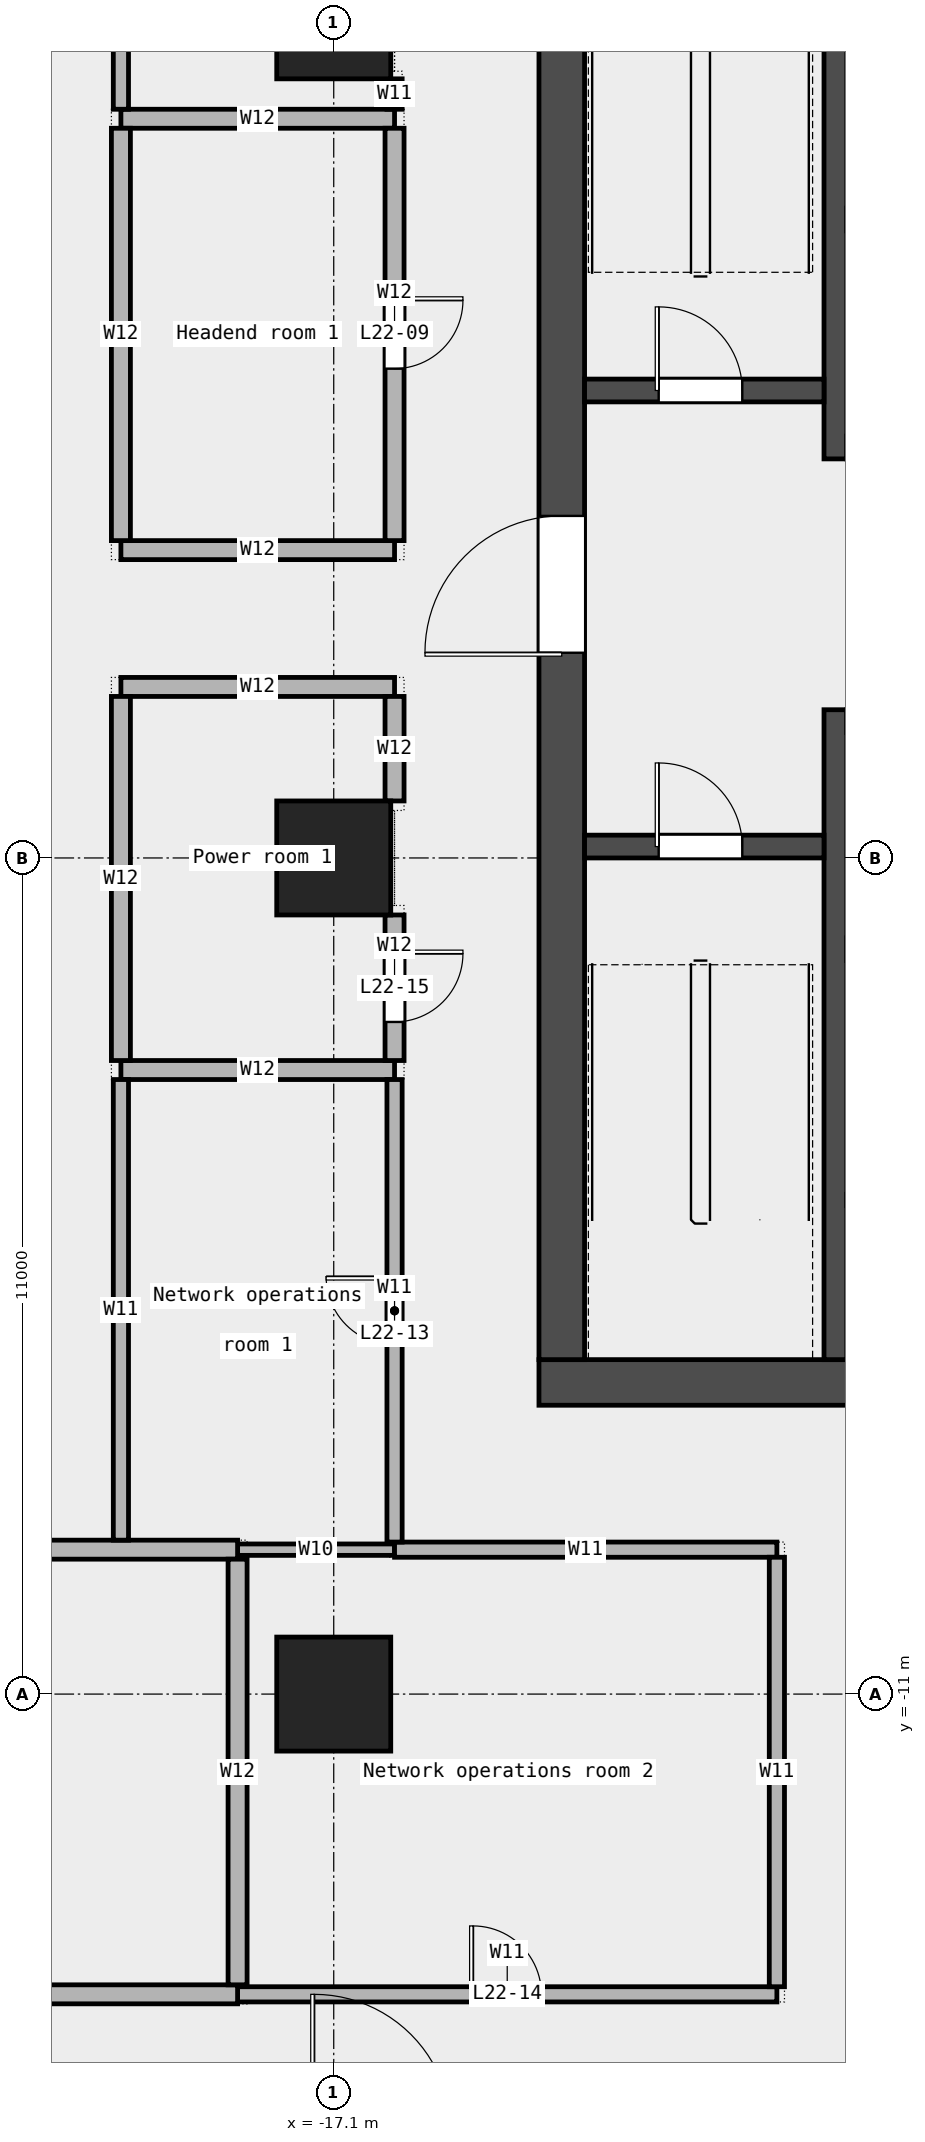
"""IFC4 building model, lengths in metres.
Left out: names, types, materials, properties, quantities, classifications, styles, units other than length and angle.
Written with IfcOpenShell. Run it as: python <this file> out.ifc"""

import sys

from ifc_helpers import new_model, si_unit, direction, frame, frame_2d, origin, origin_2d, place, context, subcontext, project, spatial, rectangle, extrude, element, fill, save


model = new_model("IFC4")
c1 = context("Model", 3, precision=1e-05, world=origin(), true_north=direction((0.0, 1.0)))
c2 = subcontext(c1, "Body", "Model", "MODEL_VIEW")
j1 = project(units=[si_unit("LENGTHUNIT", "METRE"), si_unit("PLANEANGLEUNIT", "RADIAN")], contexts=[c1])
p1 = place(None, origin())
s1 = spatial("IfcSite", under=j1, at=p1, CompositionType="ELEMENT")
p2 = place(p1, origin())
s2 = spatial("IfcBuilding", under=s1, at=p2, CompositionType="ELEMENT")
p3 = place(p2, frame((0.0, 0.0, 112.6)))
s3 = spatial("IfcBuildingStorey", under=s2, at=p3, CompositionType="ELEMENT", Elevation=112.6)
for number, where, z_axis, x_axis in (
    (1, (-17.1, -11.0, 0.0), (0.0, 0.0, 1.0), (1.0, 0.0, 0.0)),
    (2, (-17.1, 0.0, 0.0), (0.0, 0.0, 1.0), (1.0, 0.0, 0.0)),
    (3, (-17.1, 11.0, 0.0), (0.0, 0.0, 1.0), (1.0, 0.0, 0.0)),
):
    element("IfcColumn", number, at=place(p3, frame(where, z_axis=z_axis, x_axis=x_axis)), inside=s3, PredefinedType="COLUMN", context=c2, shape_type="SweptSolid", body=[
        extrude(rectangle(XDim=1.5, YDim=1.5, at=origin_2d()), origin(), (0.0, 0.0, 1.0), 4.05),
    ])
p4 = place(p3, frame((-18.365, -14.95, 0.0), z_axis=(0.0, 0.0, 1.0), x_axis=(1.0, 0.0, 0.0)))
e4 = element("IfcWall", 4, at=p4, inside=s3, PredefinedType="PARTITIONING", context=c2, shape_type="SweptSolid", body=[
    extrude(rectangle(XDim=7.095, YDim=0.2, at=frame_2d((3.547, 0.0))), origin(), (0.0, 0.0, 1.0), 4.05),
])
p5 = place(p4, frame((3.097, 0.0, 0.0)))
e5 = element("IfcOpeningElement", 5, at=p5, cuts=e4, PredefinedType="OPENING", context=c2, shape_type="SweptSolid", body=[
    extrude(rectangle(XDim=0.9, YDim=2.1, at=frame_2d((0.45, 1.05))), frame((0.0, 0.112, 0.0), z_axis=(0.0, -1.0, 0.0), x_axis=(1.0, 0.0, 0.0)), (0.0, 0.0, 1.0), 0.224),
])
p6 = place(p3, frame((-29.0, -14.95, 0.0), z_axis=(0.0, 0.0, 1.0), x_axis=(1.0, 0.0, 0.0)))
e6 = element("IfcWall", 6, at=p6, inside=s3, PredefinedType="PARTITIONING", context=c2, shape_type="SweptSolid", body=[
    extrude(rectangle(XDim=10.635, YDim=0.25, at=frame_2d((5.317, 0.0))), origin(), (0.0, 0.0, 1.0), 4.05),
])
p7 = place(p6, frame((4.817, 0.0, 0.0)))
e7 = element("IfcOpeningElement", 7, at=p7, cuts=e6, PredefinedType="OPENING", context=c2, shape_type="SweptSolid", body=[
    extrude(rectangle(XDim=1.2, YDim=2.1, at=frame_2d((0.6, 1.05))), frame((0.0, 0.137, 0.0), z_axis=(0.0, -1.0, 0.0), x_axis=(1.0, 0.0, 0.0)), (0.0, 0.0, 1.0), 0.274),
])
p8 = place(p3, frame((-18.365, -9.1, 0.0), z_axis=(0.0, 0.0, 1.0), x_axis=(1.0, 0.0, 0.0)))
e8 = element("IfcWall", 8, at=p8, inside=s3, PredefinedType="PARTITIONING", context=c2, shape_type="SweptSolid", body=[
    extrude(rectangle(XDim=2.065, YDim=0.15, at=frame_2d((1.032, 0.0))), origin(), (0.0, 0.0, 1.0), 4.05),
])
p9 = place(p3, frame((-16.3, -9.1, 0.0), z_axis=(0.0, 0.0, 1.0), x_axis=(1.0, 0.0, 0.0)))
e9 = element("IfcWall", 9, at=p9, inside=s3, PredefinedType="PARTITIONING", context=c2, shape_type="SweptSolid", body=[
    extrude(rectangle(XDim=5.03, YDim=0.2, at=frame_2d((2.515, 0.0))), origin(), (0.0, 0.0, 1.0), 4.05),
])
p10 = place(p3, frame((-29.0, -9.1, 0.0), z_axis=(0.0, 0.0, 1.0), x_axis=(1.0, 0.0, 0.0)))
e10 = element("IfcWall", 10, at=p10, inside=s3, PredefinedType="PARTITIONING", context=c2, shape_type="SweptSolid", body=[
    extrude(rectangle(XDim=10.635, YDim=0.25, at=frame_2d((5.317, 0.0))), origin(), (0.0, 0.0, 1.0), 4.05),
])
for number, where, z_axis, x_axis in (
    (11, (-19.9, -2.79, 0.0), (0.0, 0.0, 1.0), (1.0, 0.0, 0.0)),
    (12, (-19.9, 2.25, 0.0), (0.0, 0.0, 1.0), (1.0, 0.0, 0.0)),
    (13, (-19.9, 4.05, 0.0), (0.0, 0.0, 1.0), (1.0, 0.0, 0.0)),
    (14, (-19.9, 9.725, 0.0), (0.0, 0.0, 1.0), (1.0, 0.0, 0.0)),
):
    element("IfcWall", number, at=place(p3, frame(where, z_axis=z_axis, x_axis=x_axis)), inside=s3, PredefinedType="PARTITIONING", context=c2, shape_type="SweptSolid", body=[
        extrude(rectangle(XDim=3.6, YDim=0.25, at=frame_2d((1.8, 0.0))), origin(), (0.0, 0.0, 1.0), 4.05),
    ])
p11 = place(p3, frame((-19.9, -8.975, 0.0), z_axis=(0.0, 0.0, 1.0), x_axis=(0.0, 1.0, 0.0)))
e15 = element("IfcWall", 15, at=p11, inside=s3, PredefinedType="PARTITIONING", context=c2, shape_type="SweptSolid", body=[
    extrude(rectangle(XDim=6.06, YDim=0.2, at=frame_2d((3.03, 0.0))), origin(), (0.0, 0.0, 1.0), 4.05),
])
p12 = place(p3, frame((-19.9, 9.85, 0.0), z_axis=(0.0, 0.0, 1.0), x_axis=(0.0, 1.0, 0.0)))
e16 = element("IfcWall", 16, at=p12, inside=s3, PredefinedType="PARTITIONING", context=c2, shape_type="SweptSolid", body=[
    extrude(rectangle(XDim=5.425, YDim=0.2, at=frame_2d((2.712, 0.0))), origin(), (0.0, 0.0, 1.0), 4.05),
])
p13 = place(p3, frame((-19.9, -2.665, 0.0), z_axis=(0.0, 0.0, 1.0), x_axis=(0.0, 1.0, 0.0)))
e17 = element("IfcWall", 17, at=p13, inside=s3, PredefinedType="PARTITIONING", context=c2, shape_type="SweptSolid", body=[
    extrude(rectangle(XDim=4.79, YDim=0.25, at=frame_2d((2.395, 0.0))), origin(), (0.0, 0.0, 1.0), 4.05),
])
p14 = place(p3, frame((-19.9, 4.175, 0.0), z_axis=(0.0, 0.0, 1.0), x_axis=(0.0, 1.0, 0.0)))
e18 = element("IfcWall", 18, at=p14, inside=s3, PredefinedType="PARTITIONING", context=c2, shape_type="SweptSolid", body=[
    extrude(rectangle(XDim=5.425, YDim=0.25, at=frame_2d((2.712, 0.0))), origin(), (0.0, 0.0, 1.0), 4.05),
])
p15 = place(p3, frame((-18.365, -14.825, 0.0), z_axis=(0.0, 0.0, 1.0), x_axis=(0.0, 1.0, 0.0)))
e19 = element("IfcWall", 19, at=p15, inside=s3, PredefinedType="PARTITIONING", context=c2, shape_type="SweptSolid", body=[
    extrude(rectangle(XDim=5.6, YDim=0.25, at=frame_2d((2.8, 0.0))), origin(), (0.0, 0.0, 1.0), 4.05),
])
p16 = place(p3, frame((-16.3, -9.0, 0.0), z_axis=(0.0, 0.0, 1.0), x_axis=(0.0, 1.0, 0.0)))
e20 = element("IfcWall", 20, at=p16, inside=s3, PredefinedType="PARTITIONING", context=c2, shape_type="SweptSolid", body=[
    extrude(rectangle(XDim=6.085, YDim=0.2, at=frame_2d((3.042, 0.0))), origin(), (0.0, 0.0, 1.0), 4.05),
])
p17 = place(p16, frame((2.593, 0.0, 0.0)))
e21 = element("IfcOpeningElement", 21, at=p17, cuts=e20, PredefinedType="OPENING", context=c2, shape_type="SweptSolid", body=[
    extrude(rectangle(XDim=0.9, YDim=2.1, at=frame_2d((0.45, 1.05))), frame((0.0, 0.112, 0.0), z_axis=(0.0, -1.0, 0.0), x_axis=(1.0, 0.0, 0.0)), (0.0, 0.0, 1.0), 0.224),
])
p18 = place(p3, frame((-16.3, 9.85, 0.0), z_axis=(0.0, 0.0, 1.0), x_axis=(0.0, 1.0, 0.0)))
e22 = element("IfcWall", 22, at=p18, inside=s3, PredefinedType="PARTITIONING", context=c2, shape_type="SweptSolid", body=[
    extrude(rectangle(XDim=0.4, YDim=0.2, at=frame_2d((0.2, 0.0))), origin(), (0.0, 0.0, 1.0), 4.05),
])
p19 = place(p3, frame((-16.3, -2.665, 0.0), z_axis=(0.0, 0.0, 1.0), x_axis=(0.0, 1.0, 0.0)))
e23 = element("IfcWall", 23, at=p19, inside=s3, PredefinedType="PARTITIONING", context=c2, shape_type="SweptSolid", body=[
    extrude(rectangle(XDim=1.915, YDim=0.25, at=frame_2d((0.958, 0.0))), origin(), (0.0, 0.0, 1.0), 4.05),
])
p20 = place(p19, frame((0.508, 0.0, 0.0)))
e24 = element("IfcOpeningElement", 24, at=p20, cuts=e23, PredefinedType="OPENING", context=c2, shape_type="SweptSolid", body=[
    extrude(rectangle(XDim=0.9, YDim=2.1, at=frame_2d((0.45, 1.05))), frame((0.0, 0.137, 0.0), z_axis=(0.0, -1.0, 0.0), x_axis=(1.0, 0.0, 0.0)), (0.0, 0.0, 1.0), 0.274),
])
p21 = place(p3, frame((-16.3, 0.75, 0.0), z_axis=(0.0, 0.0, 1.0), x_axis=(0.0, 1.0, 0.0)))
e25 = element("IfcWall", 25, at=p21, inside=s3, PredefinedType="PARTITIONING", context=c2, shape_type="SweptSolid", body=[
    extrude(rectangle(XDim=1.375, YDim=0.25, at=frame_2d((0.688, 0.0))), origin(), (0.0, 0.0, 1.0), 4.05),
])
p22 = place(p3, frame((-16.3, 4.175, 0.0), z_axis=(0.0, 0.0, 1.0), x_axis=(0.0, 1.0, 0.0)))
e26 = element("IfcWall", 26, at=p22, inside=s3, PredefinedType="PARTITIONING", context=c2, shape_type="SweptSolid", body=[
    extrude(rectangle(XDim=5.425, YDim=0.25, at=frame_2d((2.712, 0.0))), origin(), (0.0, 0.0, 1.0), 4.05),
])
p23 = place(p22, frame((2.262, 0.0, 0.0)))
e27 = element("IfcOpeningElement", 27, at=p23, cuts=e26, PredefinedType="OPENING", context=c2, shape_type="SweptSolid", body=[
    extrude(rectangle(XDim=0.9, YDim=2.1, at=frame_2d((0.45, 1.05))), frame((0.0, 0.137, 0.0), z_axis=(0.0, -1.0, 0.0), x_axis=(1.0, 0.0, 0.0)), (0.0, 0.0, 1.0), 0.274),
])
p24 = place(p3, frame((-11.27, -14.85, 0.0), z_axis=(0.0, 0.0, 1.0), x_axis=(0.0, 1.0, 0.0)))
e28 = element("IfcWall", 28, at=p24, inside=s3, PredefinedType="PARTITIONING", context=c2, shape_type="SweptSolid", body=[
    extrude(rectangle(XDim=5.65, YDim=0.2, at=frame_2d((2.825, 0.0))), origin(), (0.0, 0.0, 1.0), 4.05),
])
p25 = place(p3, frame((-14.4, -6.9, 0.0), z_axis=(0.0, 0.0, 1.0), x_axis=(1.0, 0.0, 0.0)))
e29 = element("IfcWall", 29, at=p25, inside=s3, PredefinedType="SHEAR", context=c2, shape_type="SweptSolid", body=[
    extrude(rectangle(XDim=28.8, YDim=0.6, at=frame_2d((14.4, 0.0))), origin(), (0.0, 0.0, 1.0), 4.2),
])
p26 = place(p25, frame((7.05, 0.0, 0.0)))
e30 = element("IfcOpeningElement", 30, at=p26, cuts=e29, PredefinedType="OPENING", context=c2, shape_type="SweptSolid", body=[
    extrude(rectangle(XDim=1.2, YDim=2.1, at=frame_2d((0.6, 1.05))), frame((0.0, 0.312, 0.0), z_axis=(0.0, -1.0, 0.0), x_axis=(1.0, 0.0, 0.0)), (0.0, 0.0, 1.0), 0.624),
])
p27 = place(p25, frame((11.837, 0.0, 0.0)))
e31 = element("IfcOpeningElement", 31, at=p27, cuts=e29, PredefinedType="OPENING", context=c2, shape_type="SweptSolid", body=[
    extrude(rectangle(XDim=1.0, YDim=2.1, at=frame_2d((0.5, 1.05))), frame((0.0, 0.312, 0.0), z_axis=(0.0, -1.0, 0.0), x_axis=(1.0, 0.0, 0.0)), (0.0, 0.0, 1.0), 0.624),
])
p28 = place(p25, frame((13.712, 0.0, 0.0)))
e32 = element("IfcOpeningElement", 32, at=p28, cuts=e29, PredefinedType="OPENING", context=c2, shape_type="SweptSolid", body=[
    extrude(rectangle(XDim=1.0, YDim=2.1, at=frame_2d((0.5, 1.05))), frame((0.0, 0.312, 0.0), z_axis=(0.0, -1.0, 0.0), x_axis=(1.0, 0.0, 0.0)), (0.0, 0.0, 1.0), 0.624),
])
p29 = place(p25, frame((15.587, 0.0, 0.0)))
e33 = element("IfcOpeningElement", 33, at=p29, cuts=e29, PredefinedType="OPENING", context=c2, shape_type="SweptSolid", body=[
    extrude(rectangle(XDim=1.0, YDim=2.1, at=frame_2d((0.5, 1.05))), frame((0.0, 0.312, 0.0), z_axis=(0.0, -1.0, 0.0), x_axis=(1.0, 0.0, 0.0)), (0.0, 0.0, 1.0), 0.624),
])
p30 = place(p25, frame((18.75, 0.0, 0.0)))
e34 = element("IfcOpeningElement", 34, at=p30, cuts=e29, PredefinedType="OPENING", context=c2, shape_type="SweptSolid", body=[
    extrude(rectangle(XDim=1.8, YDim=2.1, at=frame_2d((0.9, 1.05))), frame((0.0, 0.312, 0.0), z_axis=(0.0, -1.0, 0.0), x_axis=(1.0, 0.0, 0.0)), (0.0, 0.0, 1.0), 0.624),
])
p31 = place(p25, frame((23.087, 0.0, 0.0)))
e35 = element("IfcOpeningElement", 35, at=p31, cuts=e29, PredefinedType="OPENING", context=c2, shape_type="SweptSolid", body=[
    extrude(rectangle(XDim=1.0, YDim=2.1, at=frame_2d((0.5, 1.05))), frame((0.0, 0.312, 0.0), z_axis=(0.0, -1.0, 0.0), x_axis=(1.0, 0.0, 0.0)), (0.0, 0.0, 1.0), 0.624),
])
p32 = place(p3, frame((-14.1, -6.6, 0.0), z_axis=(0.0, 0.0, 1.0), x_axis=(0.0, 1.0, 0.0)))
e36 = element("IfcWall", 36, at=p32, inside=s3, PredefinedType="SHEAR", context=c2, shape_type="SweptSolid", body=[
    extrude(rectangle(XDim=19.5, YDim=0.6, at=frame_2d((9.75, 0.0))), origin(), (0.0, 0.0, 1.0), 4.2),
])
p33 = place(p32, frame((9.3, 0.0, 0.0)))
e37 = element("IfcOpeningElement", 37, at=p33, cuts=e36, PredefinedType="OPENING", context=c2, shape_type="SweptSolid", body=[
    extrude(rectangle(XDim=1.8, YDim=2.1, at=frame_2d((0.9, 1.05))), frame((0.0, 0.312, 0.0), z_axis=(0.0, -1.0, 0.0), x_axis=(1.0, 0.0, 0.0)), (0.0, 0.0, 1.0), 0.624),
])
p34 = place(p3, frame((-10.5, -6.6, 0.0), z_axis=(0.0, 0.0, 1.0), x_axis=(0.0, 1.0, 0.0)))
e38 = element("IfcWall", 38, at=p34, inside=s3, PredefinedType="SHEAR", context=c2, shape_type="SweptSolid", body=[
    extrude(rectangle(XDim=8.55, YDim=0.3, at=frame_2d((4.275, 0.0))), origin(), (0.0, 0.0, 1.0), 4.2),
])
p35 = place(p3, frame((-10.5, 5.25, 0.0), z_axis=(0.0, 0.0, 1.0), x_axis=(0.0, 1.0, 0.0)))
e39 = element("IfcWall", 39, at=p35, inside=s3, PredefinedType="SHEAR", context=c2, shape_type="SweptSolid", body=[
    extrude(rectangle(XDim=7.65, YDim=0.3, at=frame_2d((3.825, 0.0))), origin(), (0.0, 0.0, 1.0), 4.2),
])
p36 = place(p3, frame((-13.8, 0.15, 0.0), z_axis=(0.0, 0.0, 1.0), x_axis=(1.0, 0.0, 0.0)))
e40 = element("IfcWall", 40, at=p36, inside=s3, PredefinedType="SOLIDWALL", context=c2, shape_type="SweptSolid", body=[
    extrude(rectangle(XDim=3.15, YDim=0.3, at=frame_2d((1.575, 0.0))), origin(), (0.0, 0.0, 1.0), 4.2),
])
p37 = place(p36, frame((0.975, 0.0, 0.0)))
e41 = element("IfcOpeningElement", 41, at=p37, cuts=e40, PredefinedType="OPENING", context=c2, shape_type="SweptSolid", body=[
    extrude(rectangle(XDim=1.1, YDim=2.1, at=frame_2d((0.55, 1.05))), frame((0.0, 0.162, 0.0), z_axis=(0.0, -1.0, 0.0), x_axis=(1.0, 0.0, 0.0)), (0.0, 0.0, 1.0), 0.324),
])
p38 = place(p3, frame((-13.8, 6.15, 0.0), z_axis=(0.0, 0.0, 1.0), x_axis=(1.0, 0.0, 0.0)))
e42 = element("IfcWall", 42, at=p38, inside=s3, PredefinedType="SOLIDWALL", context=c2, shape_type="SweptSolid", body=[
    extrude(rectangle(XDim=3.15, YDim=0.3, at=frame_2d((1.575, 0.0))), origin(), (0.0, 0.0, 1.0), 4.2),
])
p39 = place(p38, frame((0.975, 0.0, 0.0)))
e43 = element("IfcOpeningElement", 43, at=p39, cuts=e42, PredefinedType="OPENING", context=c2, shape_type="SweptSolid", body=[
    extrude(rectangle(XDim=1.1, YDim=2.1, at=frame_2d((0.55, 1.05))), frame((0.0, 0.162, 0.0), z_axis=(0.0, -1.0, 0.0), x_axis=(1.0, 0.0, 0.0)), (0.0, 0.0, 1.0), 0.324),
])
p40 = place(p23, origin())
e44 = element("IfcDoor", 44, at=p40, inside=s3, OperationType="SINGLE_SWING_LEFT", PredefinedType="DOOR", context=c2, shape_type="SweptSolid", body=[
    extrude(rectangle(XDim=0.9, YDim=2.1, at=frame_2d((0.45, 1.05))), frame((0.0, 0.025, 0.0), z_axis=(0.0, -1.0, 0.0), x_axis=(1.0, 0.0, 0.0)), (0.0, 0.0, 1.0), 0.05),
])
fill(e27, e44)
p41 = place(p17, origin())
e45 = element("IfcDoor", 45, at=p41, inside=s3, OperationType="SINGLE_SWING_RIGHT", PredefinedType="DOOR", context=c2, shape_type="SweptSolid", body=[
    extrude(rectangle(XDim=0.9, YDim=2.1, at=frame_2d((0.45, 1.05))), frame((0.0, 0.025, 0.0), z_axis=(0.0, -1.0, 0.0), x_axis=(1.0, 0.0, 0.0)), (0.0, 0.0, 1.0), 0.05),
])
fill(e21, e45)
p42 = place(p5, origin())
e46 = element("IfcDoor", 46, at=p42, inside=s3, OperationType="SINGLE_SWING_LEFT", PredefinedType="DOOR", context=c2, shape_type="SweptSolid", body=[
    extrude(rectangle(XDim=0.9, YDim=2.1, at=frame_2d((0.45, 1.05))), frame((0.0, 0.025, 0.0), z_axis=(0.0, -1.0, 0.0), x_axis=(1.0, 0.0, 0.0)), (0.0, 0.0, 1.0), 0.05),
])
fill(e5, e46)
p43 = place(p20, origin())
e47 = element("IfcDoor", 47, at=p43, inside=s3, OperationType="SINGLE_SWING_LEFT", PredefinedType="DOOR", context=c2, shape_type="SweptSolid", body=[
    extrude(rectangle(XDim=0.9, YDim=2.1, at=frame_2d((0.45, 1.05))), frame((0.0, 0.025, 0.0), z_axis=(0.0, -1.0, 0.0), x_axis=(1.0, 0.0, 0.0)), (0.0, 0.0, 1.0), 0.05),
])
fill(e24, e47)
p44 = place(p37, origin())
e48 = element("IfcDoor", 48, at=p44, inside=s3, OperationType="SINGLE_SWING_LEFT", PredefinedType="DOOR", context=c2, shape_type="SweptSolid", body=[
    extrude(rectangle(XDim=1.1, YDim=2.1, at=frame_2d((0.55, 1.05))), frame((0.0, 0.025, 0.0), z_axis=(0.0, -1.0, 0.0), x_axis=(1.0, 0.0, 0.0)), (0.0, 0.0, 1.0), 0.05),
])
fill(e41, e48)
p45 = place(p39, origin())
e49 = element("IfcDoor", 49, at=p45, inside=s3, OperationType="SINGLE_SWING_LEFT", PredefinedType="DOOR", context=c2, shape_type="SweptSolid", body=[
    extrude(rectangle(XDim=1.1, YDim=2.1, at=frame_2d((0.55, 1.05))), frame((0.0, 0.025, 0.0), z_axis=(0.0, -1.0, 0.0), x_axis=(1.0, 0.0, 0.0)), (0.0, 0.0, 1.0), 0.05),
])
fill(e43, e49)
p46 = place(p33, origin())
e50 = element("IfcDoor", 50, at=p46, inside=s3, OperationType="DOUBLE_DOOR_SINGLE_SWING", PredefinedType="DOOR", context=c2, shape_type="SweptSolid", body=[
    extrude(rectangle(XDim=1.8, YDim=2.1, at=frame_2d((0.9, 1.05))), frame((0.0, 0.025, 0.0), z_axis=(0.0, -1.0, 0.0), x_axis=(1.0, 0.0, 0.0)), (0.0, 0.0, 1.0), 0.05),
])
fill(e37, e50)
save(model, sys.argv[1])
